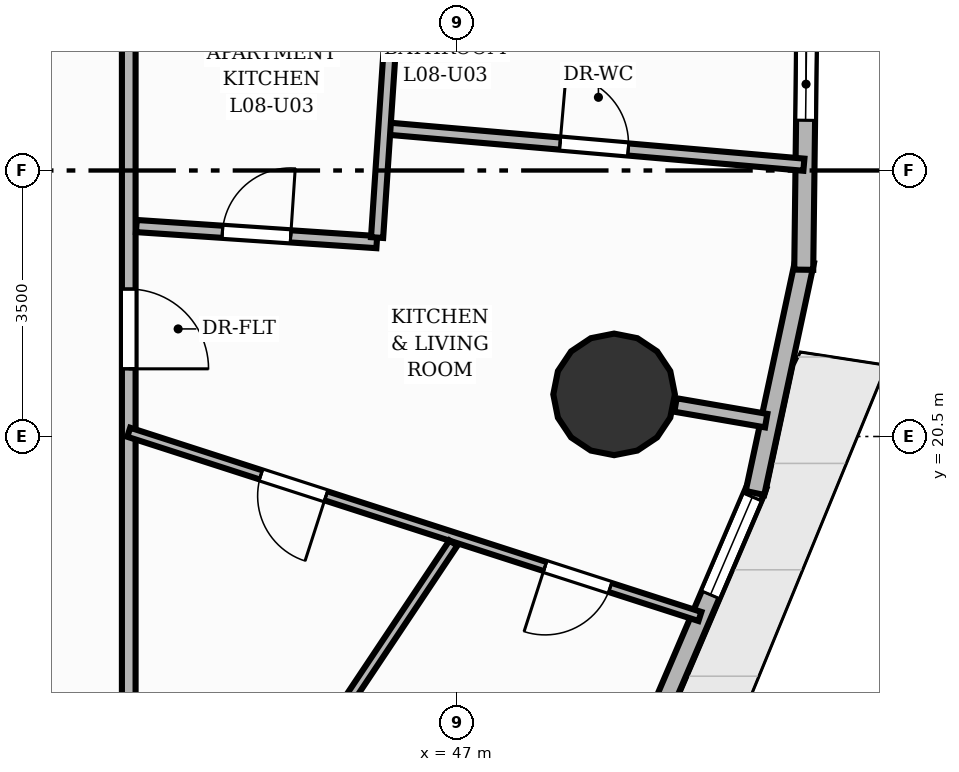
"""IFC4 building model, lengths in metres.
Left out: names, types, materials, properties, quantities, classifications, styles, units other than length and angle.
Written with IfcOpenShell. Run it as: python <this file> out.ifc"""

import sys

from ifc_helpers import new_model, si_unit, direction, frame, frame_2d, origin, origin_2d, place, context, subcontext, project, spatial, rectangle, circle, extrude, element, fill, save


model = new_model("IFC4")
c1 = context("Model", 3, precision=1e-05, world=origin(), true_north=direction((0.0, 1.0)))
c2 = subcontext(c1, "Body", "Model", "MODEL_VIEW")
j1 = project(units=[si_unit("LENGTHUNIT", "METRE"), si_unit("PLANEANGLEUNIT", "RADIAN")], contexts=[c1])
p1 = place(None, origin())
s1 = spatial("IfcSite", under=j1, at=p1, CompositionType="ELEMENT")
p2 = place(p1, origin())
s2 = spatial("IfcBuilding", under=s1, at=p2, CompositionType="ELEMENT")
p3 = place(p2, frame((0.0, 0.0, 31.2)))
s3 = spatial("IfcBuildingStorey", under=s2, at=p3, CompositionType="ELEMENT", Elevation=31.2)
p4 = place(p3, frame((49.066, 21.054, 0.0), z_axis=(0.0, 0.0, 1.0), x_axis=(1.0, 0.0, 0.0)))
e1 = element("IfcColumn", 1, at=p4, inside=s3, PredefinedType="COLUMN", context=c2, shape_type="SweptSolid", body=[
    extrude(circle(Radius=0.8, at=origin_2d()), origin(), (0.0, 0.0, 1.0), 3.2),
])
p5 = place(p3, frame((50.954, 19.865, 0.0), z_axis=(0.0, 0.0, 1.0), x_axis=(-0.393733630937, -0.91922457967, 0.0)))
e2 = element("IfcWall", 2, at=p5, inside=s3, PredefinedType="SOLIDWALL", context=c2, shape_type="SweptSolid", body=[
    extrude(rectangle(XDim=3.174, YDim=0.25, at=frame_2d((1.587, 0.0))), origin(), (0.0, 0.0, 1.0), 2.96),
])
p6 = place(p5, frame((0.175, 0.0, 0.85)))
e3 = element("IfcOpeningElement", 3, at=p6, cuts=e2, PredefinedType="OPENING", context=c2, shape_type="SweptSolid", body=[
    extrude(rectangle(XDim=1.4, YDim=1.55, at=frame_2d((0.7, 0.775))), frame((0.0, 0.135, 0.0), z_axis=(0.0, -1.0, 0.0), x_axis=(1.0, 0.0, 0.0)), (0.0, 0.0, 1.0), 0.27),
])
p7 = place(p3, frame((51.573, 22.808, 0.0), z_axis=(0.0, 0.0, 1.0), x_axis=(-0.209668000253, -0.977772637002, 0.0)))
e4 = element("IfcWall", 4, at=p7, inside=s3, PredefinedType="SOLIDWALL", context=c2, shape_type="SweptSolid", body=[
    extrude(rectangle(XDim=3.121, YDim=0.25, at=frame_2d((1.56, 0.0))), origin(), (0.0, 0.0, 1.0), 2.96),
])
p8 = place(p3, frame((51.599, 25.786, 0.0), z_axis=(0.0, 0.0, 1.0), x_axis=(-0.012397373015, -0.999923149618, 0.0)))
e5 = element("IfcWall", 5, at=p8, inside=s3, PredefinedType="SOLIDWALL", context=c2, shape_type="SweptSolid", body=[
    extrude(rectangle(XDim=3.092, YDim=0.25, at=frame_2d((1.546, 0.0))), origin(), (0.0, 0.0, 1.0), 2.96),
])
p9 = place(p8, frame((0.175, 0.0, 0.85)))
e6 = element("IfcOpeningElement", 6, at=p9, cuts=e5, PredefinedType="OPENING", context=c2, shape_type="SweptSolid", body=[
    extrude(rectangle(XDim=0.95, YDim=1.45, at=frame_2d((0.475, 0.725))), frame((0.0, 0.135, 0.0), z_axis=(0.0, -1.0, 0.0), x_axis=(1.0, 0.0, 0.0)), (0.0, 0.0, 1.0), 0.27),
])
p10 = place(p3, frame((49.874, 20.915, 0.0), z_axis=(0.0, 0.0, 1.0), x_axis=(0.985412344637, -0.170183756676, 0.0)))
e7 = element("IfcWall", 7, at=p10, inside=s3, PredefinedType="PARTITIONING", context=c2, shape_type="SweptSolid", body=[
    extrude(rectangle(XDim=1.211, YDim=0.18, at=frame_2d((0.605, 0.0))), origin(), (0.0, 0.0, 1.0), 2.178),
])
p11 = place(p3, frame((42.68, 32.68, 0.0), z_axis=(0.0, 0.0, 1.0), x_axis=(0.0, -1.0, 0.0)))
e8 = element("IfcWall", 8, at=p11, inside=s3, PredefinedType="PARTITIONING", context=c2, shape_type="SweptSolid", body=[
    extrude(rectangle(XDim=17.36, YDim=0.18, at=frame_2d((8.68, 0.0))), origin(), (0.0, 0.0, 1.0), 2.955),
])
p12 = place(p11, frame((10.24, 0.0, 0.0)))
e9 = element("IfcOpeningElement", 9, at=p12, cuts=e8, PredefinedType="OPENING", context=c2, shape_type="SweptSolid", body=[
    extrude(rectangle(XDim=1.05, YDim=2.15, at=frame_2d((0.525, 1.075))), frame((0.0, 0.1, 0.0), z_axis=(0.0, -1.0, 0.0), x_axis=(1.0, 0.0, 0.0)), (0.0, 0.0, 1.0), 0.2),
])
p13 = place(p3, frame((46.044, 24.555, 0.0), z_axis=(0.0, 0.0, 1.0), x_axis=(0.996262385211, -0.086378584226, 0.0)))
e10 = element("IfcWall", 10, at=p13, inside=s3, PredefinedType="PLUMBINGWALL", context=c2, shape_type="SweptSolid", body=[
    extrude(rectangle(XDim=5.54, YDim=0.16, at=frame_2d((2.77, 0.0))), origin(), (0.0, 0.0, 1.0), 2.641),
])
p14 = place(p13, frame((2.32, 0.0, 0.0)))
e11 = element("IfcOpeningElement", 11, at=p14, cuts=e10, PredefinedType="OPENING", context=c2, shape_type="SweptSolid", body=[
    extrude(rectangle(XDim=0.9, YDim=2.1, at=frame_2d((0.45, 1.05))), frame((0.0, 0.09, 0.0), z_axis=(0.0, -1.0, 0.0), x_axis=(1.0, 0.0, 0.0)), (0.0, 0.0, 1.0), 0.18),
])
p15 = place(p3, frame((50.195, 18.132, 0.0), z_axis=(0.0, 0.0, 1.0), x_axis=(-0.951723769721, 0.306955804879, 0.0)))
e12 = element("IfcWall", 12, at=p15, inside=s3, PredefinedType="PARTITIONING", context=c2, shape_type="SweptSolid", body=[
    extrude(rectangle(XDim=7.896, YDim=0.125, at=frame_2d((3.948, 0.0))), origin(), (0.0, 0.0, 1.0), 2.955),
])
p16 = place(p15, frame((1.241, 0.0, 0.0)))
e13 = element("IfcOpeningElement", 13, at=p16, cuts=e12, PredefinedType="OPENING", context=c2, shape_type="SweptSolid", body=[
    extrude(rectangle(XDim=0.9, YDim=2.1, at=frame_2d((0.45, 1.05))), frame((0.0, 0.073, 0.0), z_axis=(0.0, -1.0, 0.0), x_axis=(1.0, 0.0, 0.0)), (0.0, 0.0, 1.0), 0.145),
])
p17 = place(p15, frame((5.169, 0.0, 0.0)))
e14 = element("IfcOpeningElement", 14, at=p17, cuts=e12, PredefinedType="OPENING", context=c2, shape_type="SweptSolid", body=[
    extrude(rectangle(XDim=0.9, YDim=2.1, at=frame_2d((0.45, 1.05))), frame((0.0, 0.073, 0.0), z_axis=(0.0, -1.0, 0.0), x_axis=(1.0, 0.0, 0.0)), (0.0, 0.0, 1.0), 0.145),
])
p18 = place(p3, frame((42.78, 23.269, 0.0), z_axis=(0.0, 0.0, 1.0), x_axis=(0.99776911562, -0.066759208461, 0.0)))
e15 = element("IfcWall", 15, at=p18, inside=s3, PredefinedType="PLUMBINGWALL", context=c2, shape_type="SweptSolid", body=[
    extrude(rectangle(XDim=3.171, YDim=0.16, at=frame_2d((1.585, 0.0))), origin(), (0.0, 0.0, 1.0), 2.641),
])
p19 = place(p18, frame((1.135, 0.0, 0.0)))
e16 = element("IfcOpeningElement", 16, at=p19, cuts=e15, PredefinedType="OPENING", context=c2, shape_type="SweptSolid", body=[
    extrude(rectangle(XDim=0.9, YDim=2.1, at=frame_2d((0.45, 1.05))), frame((0.0, 0.09, 0.0), z_axis=(0.0, -1.0, 0.0), x_axis=(1.0, 0.0, 0.0)), (0.0, 0.0, 1.0), 0.18),
])
p20 = place(p3, frame((45.947, 23.117, 0.0), z_axis=(0.0, 0.0, 1.0), x_axis=(0.066888153037, 0.997760479766, 0.0)))
e17 = element("IfcWall", 17, at=p20, inside=s3, PredefinedType="PLUMBINGWALL", context=c2, shape_type="SweptSolid", body=[
    extrude(rectangle(XDim=3.336, YDim=0.16, at=frame_2d((1.668, 0.0))), origin(), (0.0, 0.0, 1.0), 2.955),
])
p21 = place(p3, frame((42.24, 12.037, 0.0), z_axis=(0.0, 0.0, 1.0), x_axis=(0.55508513016, 0.831793543059, 0.0)))
e18 = element("IfcWall", 18, at=p21, inside=s3, PredefinedType="PARTITIONING", context=c2, shape_type="SweptSolid", body=[
    extrude(rectangle(XDim=8.488, YDim=0.125, at=frame_2d((4.244, 0.0))), origin(), (0.0, 0.0, 1.0), 2.328),
])
p22 = place(p6, origin())
e19 = element("IfcWindow", 19, at=p22, inside=s3, PartitioningType="SINGLE_PANEL", PredefinedType="WINDOW", context=c2, shape_type="SweptSolid", body=[
    extrude(rectangle(XDim=1.4, YDim=1.55, at=frame_2d((0.7, 0.775))), frame((0.0, 0.03, 0.0), z_axis=(0.0, -1.0, 0.0), x_axis=(1.0, 0.0, 0.0)), (0.0, 0.0, 1.0), 0.06),
])
fill(e3, e19)
p23 = place(p9, origin())
e20 = element("IfcWindow", 20, at=p23, inside=s3, PartitioningType="SINGLE_PANEL", PredefinedType="WINDOW", context=c2, shape_type="SweptSolid", body=[
    extrude(rectangle(XDim=0.95, YDim=1.45, at=frame_2d((0.475, 0.725))), frame((0.0, 0.03, 0.0), z_axis=(0.0, -1.0, 0.0), x_axis=(1.0, 0.0, 0.0)), (0.0, 0.0, 1.0), 0.06),
])
fill(e6, e20)
p24 = place(p12, origin())
e21 = element("IfcDoor", 21, at=p24, inside=s3, OperationType="SINGLE_SWING_RIGHT", PredefinedType="DOOR", context=c2, shape_type="SweptSolid", body=[
    extrude(rectangle(XDim=1.05, YDim=2.15, at=frame_2d((0.525, 1.075))), frame((0.0, 0.025, 0.0), z_axis=(0.0, -1.0, 0.0), x_axis=(1.0, 0.0, 0.0)), (0.0, 0.0, 1.0), 0.05),
])
fill(e9, e21)
p25 = place(p14, origin())
e22 = element("IfcDoor", 22, at=p25, inside=s3, OperationType="SINGLE_SWING_LEFT", PredefinedType="DOOR", context=c2, shape_type="SweptSolid", body=[
    extrude(rectangle(XDim=0.9, YDim=2.1, at=frame_2d((0.45, 1.05))), frame((0.0, 0.025, 0.0), z_axis=(0.0, -1.0, 0.0), x_axis=(1.0, 0.0, 0.0)), (0.0, 0.0, 1.0), 0.05),
])
fill(e11, e22)
p26 = place(p16, origin())
e23 = element("IfcDoor", 23, at=p26, inside=s3, OperationType="SINGLE_SWING_RIGHT", PredefinedType="DOOR", context=c2, shape_type="SweptSolid", body=[
    extrude(rectangle(XDim=0.9, YDim=2.1, at=frame_2d((0.45, 1.05))), frame((0.0, 0.025, 0.0), z_axis=(0.0, -1.0, 0.0), x_axis=(1.0, 0.0, 0.0)), (0.0, 0.0, 1.0), 0.05),
])
fill(e13, e23)
p27 = place(p17, origin())
e24 = element("IfcDoor", 24, at=p27, inside=s3, OperationType="SINGLE_SWING_LEFT", PredefinedType="DOOR", context=c2, shape_type="SweptSolid", body=[
    extrude(rectangle(XDim=0.9, YDim=2.1, at=frame_2d((0.45, 1.05))), frame((0.0, 0.025, 0.0), z_axis=(0.0, -1.0, 0.0), x_axis=(1.0, 0.0, 0.0)), (0.0, 0.0, 1.0), 0.05),
])
fill(e14, e24)
p28 = place(p19, origin())
e25 = element("IfcDoor", 25, at=p28, inside=s3, OperationType="SINGLE_SWING_RIGHT", PredefinedType="DOOR", context=c2, shape_type="SweptSolid", body=[
    extrude(rectangle(XDim=0.9, YDim=2.1, at=frame_2d((0.45, 1.05))), frame((0.0, 0.025, 0.0), z_axis=(0.0, -1.0, 0.0), x_axis=(1.0, 0.0, 0.0)), (0.0, 0.0, 1.0), 0.05),
])
fill(e16, e25)
save(model, sys.argv[1])
